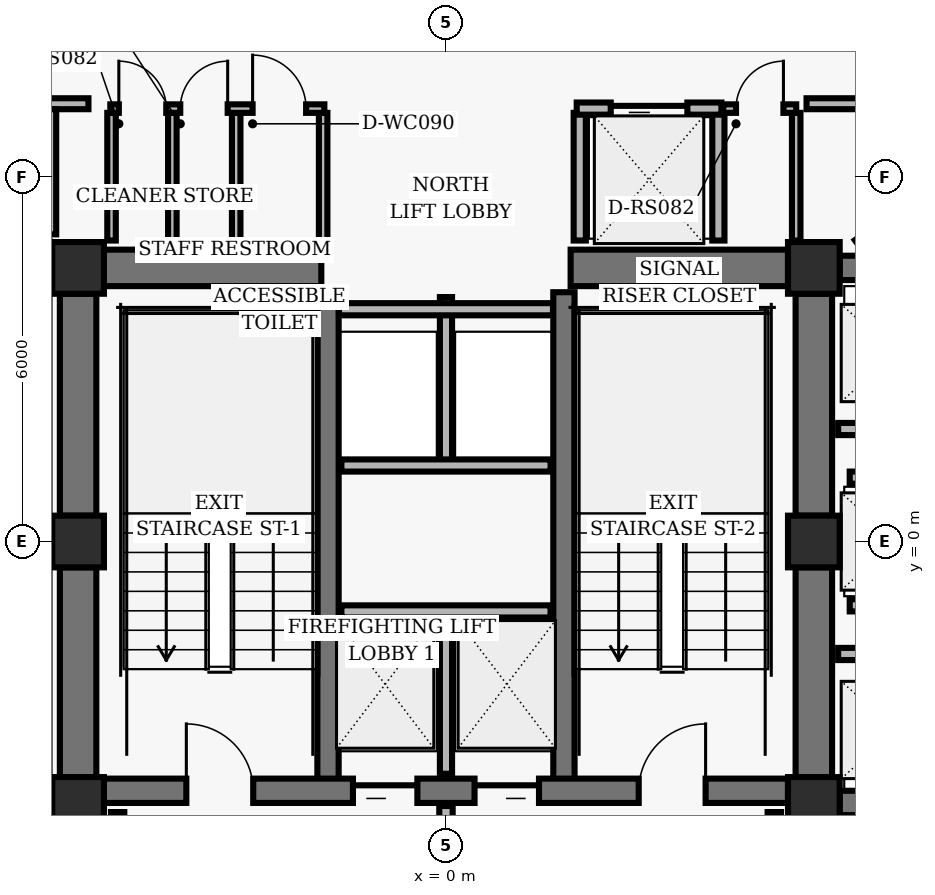
"""IFC4 building model, lengths in metres.
Left out: names, types, materials, properties, quantities, classifications, styles, units other than length and angle.
Written with IfcOpenShell. Run it as: python <this file> out.ifc"""

import sys

from ifc_helpers import new_model, si_unit, direction, frame, frame_2d, origin, origin_2d, place, context, subcontext, project, spatial, rectangle, hollow_rectangle, extrude, element, fill, save


model = new_model("IFC4")
c1 = context("Model", 3, precision=1e-05, world=origin(), true_north=direction((0.0, 1.0)))
c2 = subcontext(c1, "Body", "Model", "MODEL_VIEW")
j1 = project(units=[si_unit("LENGTHUNIT", "METRE"), si_unit("PLANEANGLEUNIT", "RADIAN")], contexts=[c1])
p1 = place(None, origin())
s1 = spatial("IfcSite", under=j1, at=p1, CompositionType="ELEMENT")
p2 = place(p1, origin())
s2 = spatial("IfcBuilding", under=s1, at=p2, CompositionType="ELEMENT")
p3 = place(p2, frame((0.0, 0.0, 107.68)))
s3 = spatial("IfcBuildingStorey", under=s2, at=p3, CompositionType="ELEMENT", Elevation=107.68)
for number, where, z_axis, x_axis in (
    (1, (-6.05, 4.5, 0.0), (0.0, 0.0, 1.0), (1.0, 0.0, 0.0)),
    (2, (6.05, 4.5, 0.0), (0.0, 0.0, 1.0), (1.0, 0.0, 0.0)),
    (3, (-6.05, 0.0, 0.0), (0.0, 0.0, 1.0), (1.0, 0.0, 0.0)),
    (4, (6.05, 0.0, 0.0), (0.0, 0.0, 1.0), (1.0, 0.0, 0.0)),
    (5, (-6.05, -4.3, 0.0), (0.0, 0.0, 1.0), (1.0, 0.0, 0.0)),
    (6, (6.05, -4.3, 0.0), (0.0, 0.0, 1.0), (1.0, 0.0, 0.0)),
):
    element("IfcColumn", number, at=place(p3, frame(where, z_axis=z_axis, x_axis=x_axis)), inside=s3, PredefinedType="COLUMN", context=c2, shape_type="SweptSolid", body=[
        extrude(hollow_rectangle(XDim=0.85, YDim=0.85, WallThickness=0.055, InnerFilletRadius=0.02, OuterFilletRadius=0.04, at=origin_2d()), origin(), (0.0, 0.0, 1.0), 3.04),
    ])
p4 = place(p3, frame((-6.05, 0.425, 0.0), z_axis=(0.0, 0.0, 1.0), x_axis=(0.0, 1.0, 0.0)))
e7 = element("IfcWall", 7, at=p4, inside=s3, PredefinedType="SHEAR", context=c2, shape_type="SweptSolid", body=[
    extrude(rectangle(XDim=3.65, YDim=0.6, at=frame_2d((1.825, 0.0))), origin(), (0.0, 0.0, 1.0), 2.788),
])
p5 = place(p3, frame((-6.05, -3.875, 0.0), z_axis=(0.0, 0.0, 1.0), x_axis=(0.0, 1.0, 0.0)))
e8 = element("IfcWall", 8, at=p5, inside=s3, PredefinedType="SHEAR", context=c2, shape_type="SweptSolid", body=[
    extrude(rectangle(XDim=3.45, YDim=0.6, at=frame_2d((1.725, 0.0))), origin(), (0.0, 0.0, 1.0), 2.788),
])
p6 = place(p3, frame((6.05, 0.425, 0.0), z_axis=(0.0, 0.0, 1.0), x_axis=(0.0, 1.0, 0.0)))
e9 = element("IfcWall", 9, at=p6, inside=s3, PredefinedType="SHEAR", context=c2, shape_type="SweptSolid", body=[
    extrude(rectangle(XDim=3.65, YDim=0.6, at=frame_2d((1.825, 0.0))), origin(), (0.0, 0.0, 1.0), 2.788),
])
p7 = place(p3, frame((6.05, -3.875, 0.0), z_axis=(0.0, 0.0, 1.0), x_axis=(0.0, 1.0, 0.0)))
e10 = element("IfcWall", 10, at=p7, inside=s3, PredefinedType="SHEAR", context=c2, shape_type="SweptSolid", body=[
    extrude(rectangle(XDim=3.45, YDim=0.6, at=frame_2d((1.725, 0.0))), origin(), (0.0, 0.0, 1.0), 2.788),
])
for number, where, z_axis, x_axis in (
    (11, (-1.94, -4.1, 0.0), (0.0, 0.0, 1.0), (0.0, 1.0, 0.0)),
    (12, (1.94, -4.1, 0.0), (0.0, 0.0, 1.0), (0.0, 1.0, 0.0)),
):
    element("IfcWall", number, at=place(p3, frame(where, z_axis=z_axis, x_axis=x_axis)), inside=s3, PredefinedType="SHEAR", context=c2, shape_type="SweptSolid", body=[
        extrude(rectangle(XDim=8.2, YDim=0.35, at=frame_2d((4.1, 0.0))), origin(), (0.0, 0.0, 1.0), 2.788),
    ])
p8 = place(p3, frame((-5.625, -4.1, 0.0), z_axis=(0.0, 0.0, 1.0), x_axis=(1.0, 0.0, 0.0)))
e13 = element("IfcWall", 13, at=p8, inside=s3, PredefinedType="SHEAR", context=c2, shape_type="SweptSolid", body=[
    extrude(rectangle(XDim=11.25, YDim=0.4, at=frame_2d((5.625, 0.0))), origin(), (0.0, 0.0, 1.0), 2.788),
])
p9 = place(p8, frame((1.355, 0.0, 0.0)))
e14 = element("IfcOpeningElement", 14, at=p9, cuts=e13, PredefinedType="OPENING", context=c2, shape_type="SweptSolid", body=[
    extrude(rectangle(XDim=1.1, YDim=2.04, at=frame_2d((0.55, 1.02))), frame((0.0, 0.21, 0.0), z_axis=(0.0, -1.0, 0.0), x_axis=(1.0, 0.0, 0.0)), (0.0, 0.0, 1.0), 0.42),
])
p10 = place(p8, frame((8.795, 0.0, 0.0)))
e15 = element("IfcOpeningElement", 15, at=p10, cuts=e13, PredefinedType="OPENING", context=c2, shape_type="SweptSolid", body=[
    extrude(rectangle(XDim=1.1, YDim=2.04, at=frame_2d((0.55, 1.02))), frame((0.0, 0.21, 0.0), z_axis=(0.0, -1.0, 0.0), x_axis=(1.0, 0.0, 0.0)), (0.0, 0.0, 1.0), 0.42),
])
p11 = place(p8, frame((4.095, 0.0, 0.0)))
e16 = element("IfcOpeningElement", 16, at=p11, cuts=e13, PredefinedType="OPENING", context=c2, shape_type="SweptSolid", body=[
    extrude(rectangle(XDim=1.06, YDim=2.04, at=frame_2d((0.53, 1.02))), frame((0.0, 0.21, 0.0), z_axis=(0.0, -1.0, 0.0), x_axis=(1.0, 0.0, 0.0)), (0.0, 0.0, 1.0), 0.42),
])
p12 = place(p8, frame((6.095, 0.0, 0.0)))
e17 = element("IfcOpeningElement", 17, at=p12, cuts=e13, PredefinedType="OPENING", context=c2, shape_type="SweptSolid", body=[
    extrude(rectangle(XDim=1.06, YDim=2.04, at=frame_2d((0.53, 1.02))), frame((0.0, 0.21, 0.0), z_axis=(0.0, -1.0, 0.0), x_axis=(1.0, 0.0, 0.0)), (0.0, 0.0, 1.0), 0.42),
])
for number, where, z_axis, x_axis in (
    (18, (-5.625, 4.5, 0.0), (0.0, 0.0, 1.0), (1.0, 0.0, 0.0)),
    (19, (2.05, 4.5, 0.0), (0.0, 0.0, 1.0), (1.0, 0.0, 0.0)),
):
    element("IfcWall", number, at=place(p3, frame(where, z_axis=z_axis, x_axis=x_axis)), inside=s3, PredefinedType="SHEAR", context=c2, shape_type="SweptSolid", body=[
        extrude(rectangle(XDim=3.575, YDim=0.6, at=frame_2d((1.788, 0.0))), origin(), (0.0, 0.0, 1.0), 2.788),
    ])
for number, where, z_axis, x_axis in (
    (20, (6.475, 4.5, 0.0), (0.0, 0.0, 1.0), (1.0, 0.0, 0.0)),
    (21, (6.475, -4.3, 0.0), (0.0, 0.0, 1.0), (1.0, 0.0, 0.0)),
):
    element("IfcWall", number, at=place(p3, frame(where, z_axis=z_axis, x_axis=x_axis)), inside=s3, PredefinedType="SHEAR", context=c2, shape_type="SweptSolid", body=[
        extrude(rectangle(XDim=2.05, YDim=0.4, at=frame_2d((1.025, 0.0))), origin(), (0.0, 0.0, 1.0), 2.788),
    ])
p13 = place(p3, frame((0.0, -3.82, 0.0), z_axis=(0.0, 0.0, 1.0), x_axis=(0.0, 1.0, 0.0)))
e22 = element("IfcWall", 22, at=p13, inside=s3, PredefinedType="PARTITIONING", context=c2, shape_type="SweptSolid", body=[
    extrude(rectangle(XDim=2.67, YDim=0.2, at=frame_2d((1.335, 0.0))), origin(), (0.0, 0.0, 1.0), 2.763),
])
p14 = place(p3, frame((-1.72, -1.15, 0.0), z_axis=(0.0, 0.0, 1.0), x_axis=(1.0, 0.0, 0.0)))
e23 = element("IfcWall", 23, at=p14, inside=s3, PredefinedType="PARTITIONING", context=c2, shape_type="SweptSolid", body=[
    extrude(rectangle(XDim=3.44, YDim=0.2, at=frame_2d((1.72, 0.0))), origin(), (0.0, 0.0, 1.0), 2.763),
])
for number, where, z_axis, x_axis in (
    (24, (-5.4, -7.16, 0.0), (0.0, 0.0, 1.0), (0.0, 1.0, 0.0)),
    (25, (5.4, -7.16, 0.0), (0.0, 0.0, 1.0), (0.0, 1.0, 0.0)),
):
    element("IfcWall", number, at=place(p3, frame(where, z_axis=z_axis, x_axis=x_axis)), inside=s3, PredefinedType="PARTITIONING", context=c2, shape_type="SweptSolid", body=[
        extrude(rectangle(XDim=2.71, YDim=0.22, at=frame_2d((1.355, 0.0))), origin(), (0.0, 0.0, 1.0), 2.763),
    ])
p15 = place(p3, frame((0.0, -7.16, 0.0), z_axis=(0.0, 0.0, 1.0), x_axis=(0.0, 1.0, 0.0)))
e26 = element("IfcWall", 26, at=p15, inside=s3, PredefinedType="PARTITIONING", context=c2, shape_type="SweptSolid", body=[
    extrude(rectangle(XDim=2.81, YDim=0.22, at=frame_2d((1.405, 0.0))), origin(), (0.0, 0.0, 1.0), 2.763),
])
p16 = place(p3, frame((0.0, 1.25, 0.0), z_axis=(0.0, 0.0, 1.0), x_axis=(0.0, 1.0, 0.0)))
e27 = element("IfcWall", 27, at=p16, inside=s3, PredefinedType="PARTITIONING", context=c2, shape_type="SweptSolid", body=[
    extrude(rectangle(XDim=2.77, YDim=0.2, at=frame_2d((1.385, 0.0))), origin(), (0.0, 0.0, 1.0), 2.763),
])
p17 = place(p3, frame((-1.72, 1.25, 0.0), z_axis=(0.0, 0.0, 1.0), x_axis=(1.0, 0.0, 0.0)))
e28 = element("IfcWall", 28, at=p17, inside=s3, PredefinedType="PARTITIONING", context=c2, shape_type="SweptSolid", body=[
    extrude(rectangle(XDim=3.44, YDim=0.2, at=frame_2d((1.72, 0.0))), origin(), (0.0, 0.0, 1.0), 2.763),
])
p18 = place(p3, frame((-1.76, 3.82, 0.0), z_axis=(0.0, 0.0, 1.0), x_axis=(1.0, 0.0, 0.0)))
e29 = element("IfcWall", 29, at=p18, inside=s3, PredefinedType="PARTITIONING", context=c2, shape_type="SweptSolid", body=[
    extrude(rectangle(XDim=3.52, YDim=0.2, at=frame_2d((1.76, 0.0))), origin(), (0.0, 0.0, 1.0), 2.763),
])
p19 = place(p3, frame((2.2, 4.95, 0.0), z_axis=(0.0, 0.0, 1.0), x_axis=(0.0, 1.0, 0.0)))
e30 = element("IfcWall", 30, at=p19, inside=s3, PredefinedType="PARTITIONING", context=c2, shape_type="SweptSolid", body=[
    extrude(rectangle(XDim=2.1, YDim=0.2, at=frame_2d((1.05, 0.0))), origin(), (0.0, 0.0, 1.0), 2.132),
])
p20 = place(p3, frame((4.48, 4.95, 0.0), z_axis=(0.0, 0.0, 1.0), x_axis=(0.0, 1.0, 0.0)))
e31 = element("IfcWall", 31, at=p20, inside=s3, PredefinedType="PARTITIONING", context=c2, shape_type="SweptSolid", body=[
    extrude(rectangle(XDim=2.1, YDim=0.2, at=frame_2d((1.05, 0.0))), origin(), (0.0, 0.0, 1.0), 2.763),
])
p21 = place(p3, frame((2.15, 7.12, 0.0), z_axis=(0.0, 0.0, 1.0), x_axis=(1.0, 0.0, 0.0)))
e32 = element("IfcWall", 32, at=p21, inside=s3, PredefinedType="PARTITIONING", context=c2, shape_type="SweptSolid", body=[
    extrude(rectangle(XDim=2.38, YDim=0.2, at=frame_2d((1.19, 0.0))), origin(), (0.0, 0.0, 1.0), 2.763),
])
p22 = place(p21, frame((0.56, 0.0, 0.0)))
e33 = element("IfcOpeningElement", 33, at=p22, cuts=e32, PredefinedType="OPENING", context=c2, shape_type="SweptSolid", body=[
    extrude(rectangle(XDim=1.26, YDim=2.06, at=frame_2d((0.63, 1.03))), frame((0.0, 0.11, 0.0), z_axis=(0.0, -1.0, 0.0), x_axis=(1.0, 0.0, 0.0)), (0.0, 0.0, 1.0), 0.22),
])
for number, where, z_axis, x_axis in (
    (34, (-5.5, 4.95, 0.0), (0.0, 0.0, 1.0), (0.0, 1.0, 0.0)),
    (35, (-4.5, 4.95, 0.0), (0.0, 0.0, 1.0), (0.0, 1.0, 0.0)),
    (36, (-3.45, 4.95, 0.0), (0.0, 0.0, 1.0), (0.0, 1.0, 0.0)),
    (37, (-2.02, 4.95, 0.0), (0.0, 0.0, 1.0), (0.0, 1.0, 0.0)),
):
    element("IfcWall", number, at=place(p3, frame(where, z_axis=z_axis, x_axis=x_axis)), inside=s3, PredefinedType="PARTITIONING", context=c2, shape_type="SweptSolid", body=[
        extrude(rectangle(XDim=2.1, YDim=0.14, at=frame_2d((1.05, 0.0))), origin(), (0.0, 0.0, 1.0), 2.763),
    ])
p23 = place(p3, frame((-5.52, 7.12, 0.0), z_axis=(0.0, 0.0, 1.0), x_axis=(1.0, 0.0, 0.0)))
e38 = element("IfcWall", 38, at=p23, inside=s3, PredefinedType="PARTITIONING", context=c2, shape_type="SweptSolid", body=[
    extrude(rectangle(XDim=3.52, YDim=0.14, at=frame_2d((1.76, 0.0))), origin(), (0.0, 0.0, 1.0), 2.763),
])
p24 = place(p23, frame((0.14, 0.0, 0.0)))
e39 = element("IfcOpeningElement", 39, at=p24, cuts=e38, PredefinedType="OPENING", context=c2, shape_type="SweptSolid", body=[
    extrude(rectangle(XDim=0.78, YDim=2.01, at=frame_2d((0.39, 1.005))), frame((0.0, 0.08, 0.0), z_axis=(0.0, -1.0, 0.0), x_axis=(1.0, 0.0, 0.0)), (0.0, 0.0, 1.0), 0.16),
])
p25 = place(p23, frame((1.15, 0.0, 0.0)))
e40 = element("IfcOpeningElement", 40, at=p25, cuts=e38, PredefinedType="OPENING", context=c2, shape_type="SweptSolid", body=[
    extrude(rectangle(XDim=0.78, YDim=2.01, at=frame_2d((0.39, 1.005))), frame((0.0, 0.08, 0.0), z_axis=(0.0, -1.0, 0.0), x_axis=(1.0, 0.0, 0.0)), (0.0, 0.0, 1.0), 0.16),
])
p26 = place(p23, frame((2.34, 0.0, 0.0)))
e41 = element("IfcOpeningElement", 41, at=p26, cuts=e38, PredefinedType="OPENING", context=c2, shape_type="SweptSolid", body=[
    extrude(rectangle(XDim=0.88, YDim=2.02, at=frame_2d((0.44, 1.01))), frame((0.0, 0.08, 0.0), z_axis=(0.0, -1.0, 0.0), x_axis=(1.0, 0.0, 0.0)), (0.0, 0.0, 1.0), 0.16),
])
p27 = place(p3, frame((5.76, 4.95, 0.0), z_axis=(0.0, 0.0, 1.0), x_axis=(0.0, 1.0, 0.0)))
e42 = element("IfcWall", 42, at=p27, inside=s3, PredefinedType="PARTITIONING", context=c2, shape_type="SweptSolid", body=[
    extrude(rectangle(XDim=2.1, YDim=0.14, at=frame_2d((1.05, 0.0))), origin(), (0.0, 0.0, 1.0), 2.132),
])
p28 = place(p3, frame((4.56, 7.12, 0.0), z_axis=(0.0, 0.0, 1.0), x_axis=(1.0, 0.0, 0.0)))
e43 = element("IfcWall", 43, at=p28, inside=s3, PredefinedType="PARTITIONING", context=c2, shape_type="SweptSolid", body=[
    extrude(rectangle(XDim=1.2, YDim=0.14, at=frame_2d((0.6, 0.0))), origin(), (0.0, 0.0, 1.0), 2.763),
])
p29 = place(p28, frame((0.21, 0.0, 0.0)))
e44 = element("IfcOpeningElement", 44, at=p29, cuts=e43, PredefinedType="OPENING", context=c2, shape_type="SweptSolid", body=[
    extrude(rectangle(XDim=0.78, YDim=2.01, at=frame_2d((0.39, 1.005))), frame((0.0, 0.08, 0.0), z_axis=(0.0, -1.0, 0.0), x_axis=(1.0, 0.0, 0.0)), (0.0, 0.0, 1.0), 0.16),
])
for number, where, z_axis, x_axis in (
    (45, (6.45, -1.85, 0.0), (0.0, 0.0, 1.0), (1.0, 0.0, 0.0)),
    (46, (6.45, 1.85, 0.0), (0.0, 0.0, 1.0), (1.0, 0.0, 0.0)),
):
    element("IfcWall", number, at=place(p3, frame(where, z_axis=z_axis, x_axis=x_axis)), inside=s3, PredefinedType="PARTITIONING", context=c2, shape_type="SweptSolid", body=[
        extrude(rectangle(XDim=2.1, YDim=0.2, at=frame_2d((1.05, 0.0))), origin(), (0.0, 0.0, 1.0), 2.763),
    ])
for number, where, z_axis, x_axis in (
    (47, (6.64, -1.05, 0.0), (0.0, 0.0, 1.0), (1.0, 0.0, 0.0)),
    (48, (6.64, 1.05, 0.0), (0.0, 0.0, 1.0), (1.0, 0.0, 0.0)),
):
    element("IfcWall", number, at=place(p3, frame(where, z_axis=z_axis, x_axis=x_axis)), inside=s3, PredefinedType="PARTITIONING", context=c2, shape_type="SweptSolid", body=[
        extrude(rectangle(XDim=1.91, YDim=0.2, at=frame_2d((0.955, 0.0))), origin(), (0.0, 0.0, 1.0), 2.763),
    ])
p30 = place(p3, frame((11.05, 7.2, 0.0), z_axis=(0.0, 0.0, 1.0), x_axis=(-1.0, 0.0, 0.0)))
e49 = element("IfcWall", 49, at=p30, inside=s3, PredefinedType="PARTITIONING", context=c2, shape_type="SweptSolid", body=[
    extrude(rectangle(XDim=5.12, YDim=0.18, at=frame_2d((2.56, 0.0))), origin(), (0.0, 0.0, 1.0), 2.763),
])
p31 = place(p3, frame((-5.88, 7.2, 0.0), z_axis=(0.0, 0.0, 1.0), x_axis=(-1.0, 0.0, 0.0)))
e50 = element("IfcWall", 50, at=p31, inside=s3, PredefinedType="PARTITIONING", context=c2, shape_type="SweptSolid", body=[
    extrude(rectangle(XDim=0.71, YDim=0.18, at=frame_2d((0.355, 0.0))), origin(), (0.0, 0.0, 1.0), 2.763),
])
p32 = place(p3, frame((-6.5, 7.11, 0.0), z_axis=(0.0, 0.0, 1.0), x_axis=(0.0, -1.0, 0.0)))
e51 = element("IfcWall", 51, at=p32, inside=s3, PredefinedType="PARTITIONING", context=c2, shape_type="SweptSolid", body=[
    extrude(rectangle(XDim=2.058, YDim=0.18, at=frame_2d((1.029, 0.0))), origin(), (0.0, 0.0, 1.0), 2.763),
])
p33 = place(p3, frame((-5.836, -4.56, 0.0), z_axis=(0.0, 0.0, 1.0), x_axis=(-0.788054366409, -0.615605649408, 0.0)))
e52 = element("IfcWall", 52, at=p33, inside=s3, PredefinedType="PARTITIONING", context=c2, shape_type="SweptSolid", body=[
    extrude(rectangle(XDim=0.74, YDim=0.24, at=frame_2d((0.37, 0.0))), origin(), (0.0, 0.0, 1.0), 2.132),
])
p34 = place(p9, origin())
e53 = element("IfcDoor", 53, at=p34, inside=s3, OperationType="SINGLE_SWING_LEFT", PredefinedType="DOOR", context=c2, shape_type="SweptSolid", body=[
    extrude(rectangle(XDim=1.1, YDim=2.04, at=frame_2d((0.55, 1.02))), frame((0.0, 0.025, 0.0), z_axis=(0.0, -1.0, 0.0), x_axis=(1.0, 0.0, 0.0)), (0.0, 0.0, 1.0), 0.05),
])
fill(e14, e53)
p35 = place(p10, origin())
e54 = element("IfcDoor", 54, at=p35, inside=s3, OperationType="SINGLE_SWING_RIGHT", PredefinedType="DOOR", context=c2, shape_type="SweptSolid", body=[
    extrude(rectangle(XDim=1.1, YDim=2.04, at=frame_2d((0.55, 1.02))), frame((0.0, 0.025, 0.0), z_axis=(0.0, -1.0, 0.0), x_axis=(1.0, 0.0, 0.0)), (0.0, 0.0, 1.0), 0.05),
])
fill(e15, e54)
p36 = place(p11, origin())
e55 = element("IfcDoor", 55, at=p36, inside=s3, OperationType="SLIDING_TO_LEFT", PredefinedType="DOOR", context=c2, shape_type="SweptSolid", body=[
    extrude(rectangle(XDim=1.06, YDim=2.04, at=frame_2d((0.53, 1.02))), frame((0.0, 0.025, 0.0), z_axis=(0.0, -1.0, 0.0), x_axis=(1.0, 0.0, 0.0)), (0.0, 0.0, 1.0), 0.05),
])
fill(e16, e55)
p37 = place(p12, origin())
e56 = element("IfcDoor", 56, at=p37, inside=s3, OperationType="SLIDING_TO_RIGHT", PredefinedType="DOOR", context=c2, shape_type="SweptSolid", body=[
    extrude(rectangle(XDim=1.06, YDim=2.04, at=frame_2d((0.53, 1.02))), frame((0.0, 0.025, 0.0), z_axis=(0.0, -1.0, 0.0), x_axis=(1.0, 0.0, 0.0)), (0.0, 0.0, 1.0), 0.05),
])
fill(e17, e56)
p38 = place(p22, origin())
e57 = element("IfcDoor", 57, at=p38, inside=s3, OperationType="SLIDING_TO_LEFT", PredefinedType="DOOR", context=c2, shape_type="SweptSolid", body=[
    extrude(rectangle(XDim=1.26, YDim=2.06, at=frame_2d((0.63, 1.03))), frame((0.0, 0.025, 0.0), z_axis=(0.0, -1.0, 0.0), x_axis=(1.0, 0.0, 0.0)), (0.0, 0.0, 1.0), 0.05),
])
fill(e33, e57)
p39 = place(p24, origin())
e58 = element("IfcDoor", 58, at=p39, inside=s3, OperationType="SINGLE_SWING_LEFT", PredefinedType="DOOR", context=c2, shape_type="SweptSolid", body=[
    extrude(rectangle(XDim=0.78, YDim=2.01, at=frame_2d((0.39, 1.005))), frame((0.0, 0.025, 0.0), z_axis=(0.0, -1.0, 0.0), x_axis=(1.0, 0.0, 0.0)), (0.0, 0.0, 1.0), 0.05),
])
fill(e39, e58)
p40 = place(p25, origin())
e59 = element("IfcDoor", 59, at=p40, inside=s3, OperationType="SINGLE_SWING_RIGHT", PredefinedType="DOOR", context=c2, shape_type="SweptSolid", body=[
    extrude(rectangle(XDim=0.78, YDim=2.01, at=frame_2d((0.39, 1.005))), frame((0.0, 0.025, 0.0), z_axis=(0.0, -1.0, 0.0), x_axis=(1.0, 0.0, 0.0)), (0.0, 0.0, 1.0), 0.05),
])
fill(e40, e59)
p41 = place(p26, origin())
e60 = element("IfcDoor", 60, at=p41, inside=s3, OperationType="SINGLE_SWING_LEFT", PredefinedType="DOOR", context=c2, shape_type="SweptSolid", body=[
    extrude(rectangle(XDim=0.88, YDim=2.02, at=frame_2d((0.44, 1.01))), frame((0.0, 0.025, 0.0), z_axis=(0.0, -1.0, 0.0), x_axis=(1.0, 0.0, 0.0)), (0.0, 0.0, 1.0), 0.05),
])
fill(e41, e60)
p42 = place(p29, origin())
e61 = element("IfcDoor", 61, at=p42, inside=s3, OperationType="SINGLE_SWING_RIGHT", PredefinedType="DOOR", context=c2, shape_type="SweptSolid", body=[
    extrude(rectangle(XDim=0.78, YDim=2.01, at=frame_2d((0.39, 1.005))), frame((0.0, 0.025, 0.0), z_axis=(0.0, -1.0, 0.0), x_axis=(1.0, 0.0, 0.0)), (0.0, 0.0, 1.0), 0.05),
])
fill(e44, e61)
save(model, sys.argv[1])
